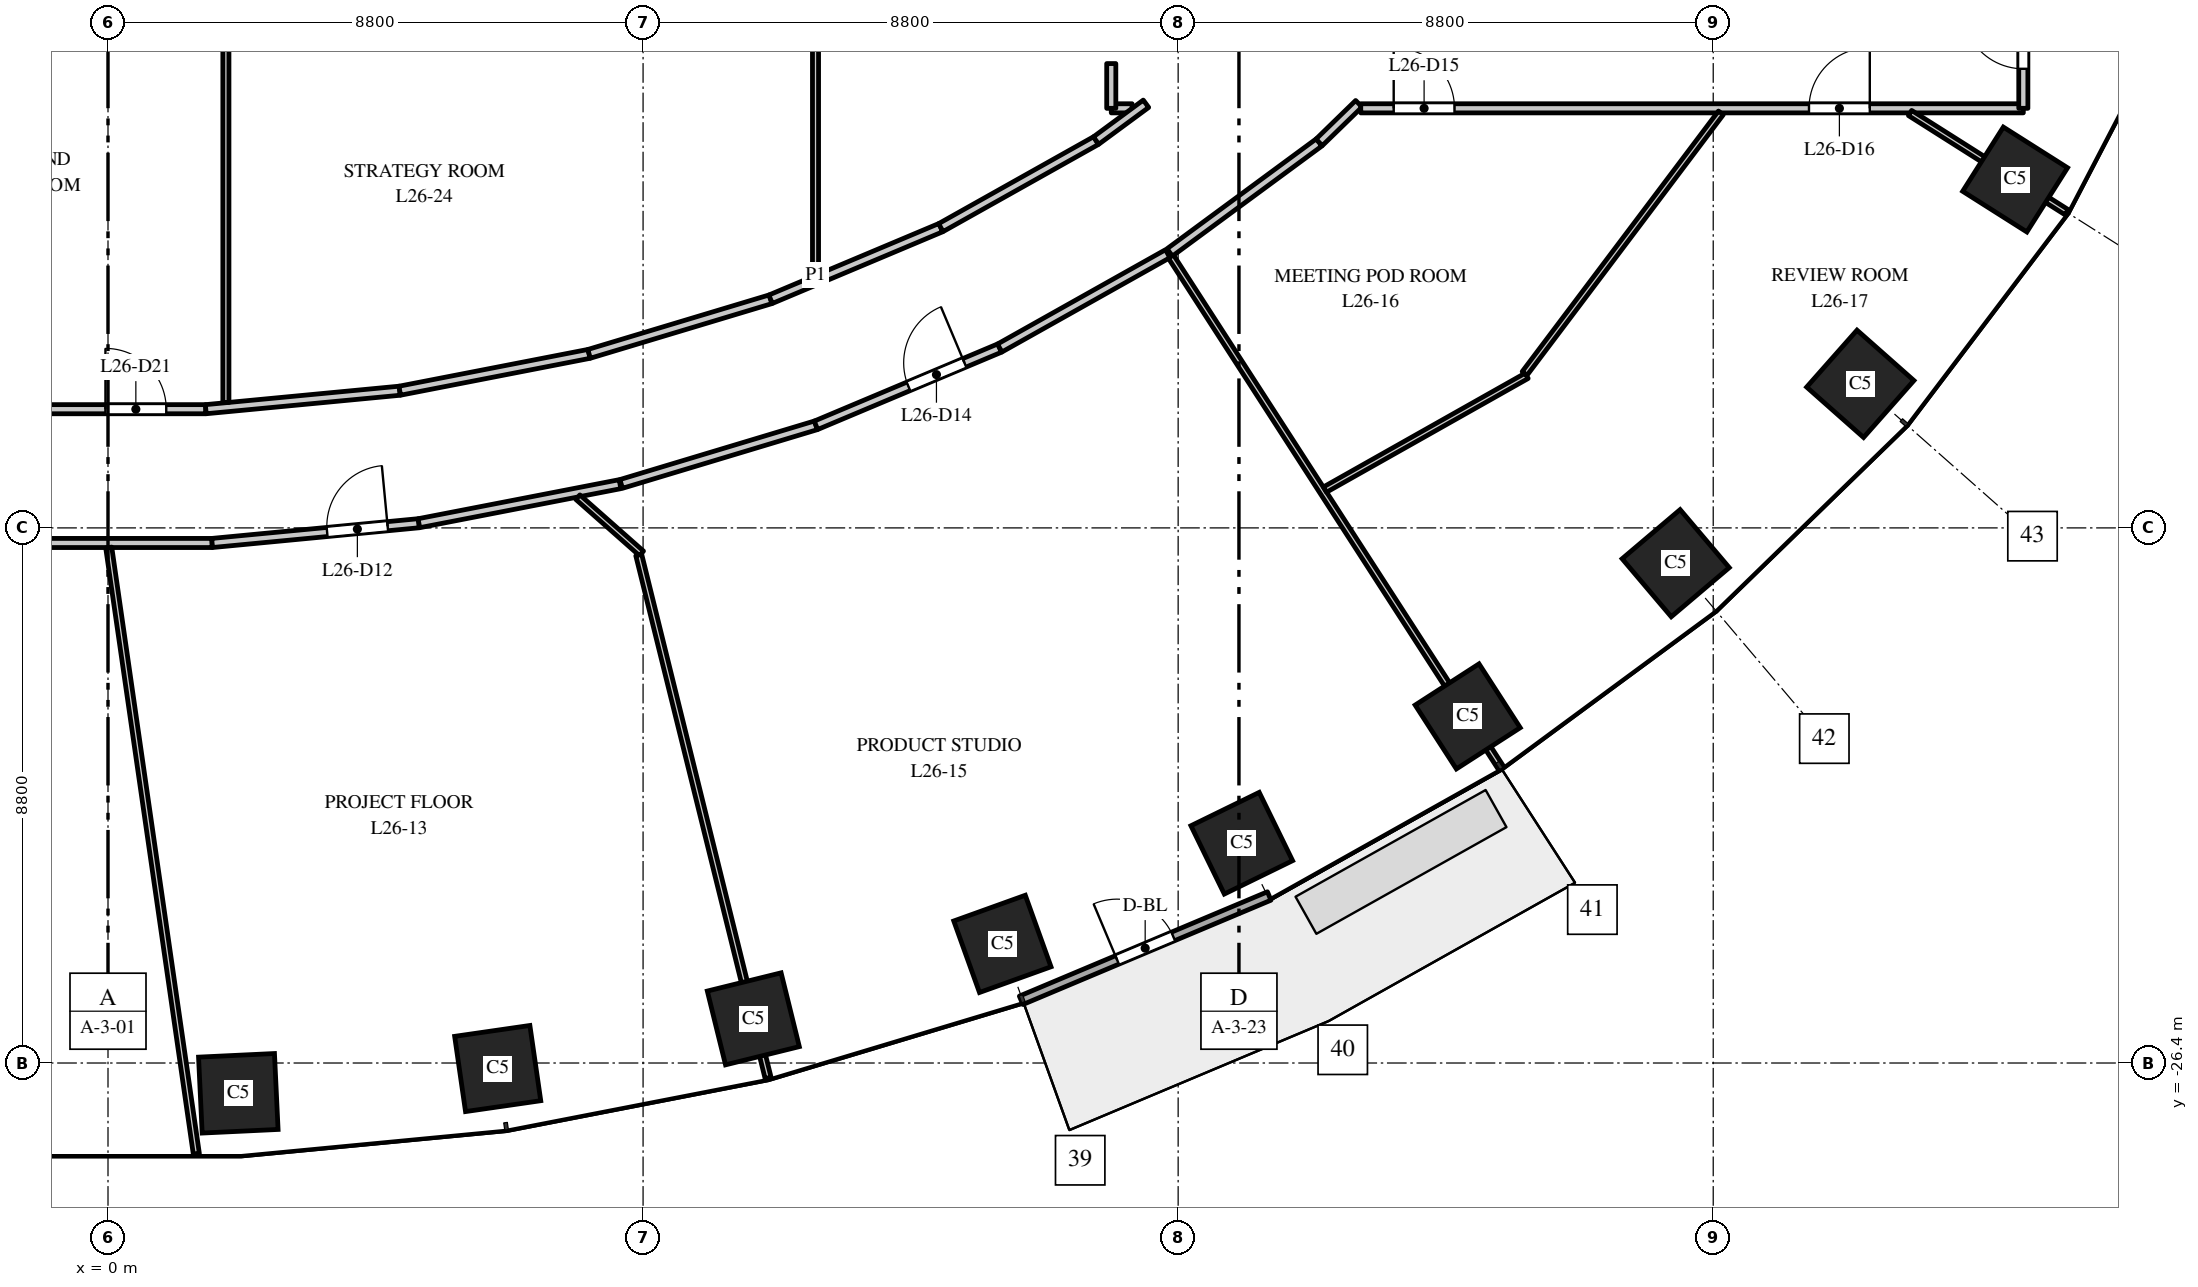
"""IFC4 building model, lengths in metres.
Left out: names, types, materials, properties, quantities, classifications, styles, units other than length and angle.
Written with IfcOpenShell. Run it as: python <this file> out.ifc"""

import sys

from ifc_helpers import new_model, si_unit, direction, frame, frame_2d, origin, origin_2d, place, context, subcontext, project, spatial, rectangle, extrude, element, fill, save


model = new_model("IFC4")
c1 = context("Model", 3, precision=1e-05, world=origin(), true_north=direction((0.0, 1.0)))
c2 = subcontext(c1, "Body", "Model", "MODEL_VIEW")
j1 = project(units=[si_unit("LENGTHUNIT", "METRE"), si_unit("PLANEANGLEUNIT", "RADIAN")], contexts=[c1])
p1 = place(None, origin())
s1 = spatial("IfcSite", under=j1, at=p1, CompositionType="ELEMENT")
p2 = place(p1, origin())
s2 = spatial("IfcBuilding", under=s1, at=p2, CompositionType="ELEMENT")
p3 = place(p2, frame((0.0, 0.0, 116.0)))
s3 = spatial("IfcBuildingStorey", under=s2, at=p3, CompositionType="ELEMENT", Elevation=116.0)
for number, where, z_axis, x_axis in (
    (1, (2.143, -26.898, 0.0), (0.0, 0.0, 1.0), (0.999, 0.048, 0.0)),
    (2, (6.409, -26.491, 0.0), (0.0, 0.0, 1.0), (0.99, 0.143, 0.0)),
    (3, (10.613, -25.674, 0.0), (0.0, 0.0, 1.0), (0.971, 0.24, 0.0)),
    (4, (14.709, -24.441, 0.0), (0.0, 0.0, 1.0), (0.941, 0.338, 0.0)),
    (5, (18.646, -22.785, 0.0), (0.0, 0.0, 1.0), (0.898, 0.439, 0.0)),
    (6, (22.362, -20.7, 0.0), (0.0, 0.0, 1.0), (0.84, 0.542, 0.0)),
    (7, (25.783, -18.18, 0.0), (0.0, 0.0, 1.0), (0.763, 0.646, 0.0)),
    (8, (28.819, -15.23, 0.0), (0.0, 0.0, 1.0), (0.663, 0.749, 0.0)),
    (9, (31.365, -11.871, 0.0), (0.0, 0.0, 1.0), (0.535, 0.845, 0.0)),
):
    element("IfcColumn", number, at=place(p3, frame(where, z_axis=z_axis, x_axis=x_axis)), inside=s3, PredefinedType="COLUMN", context=c2, shape_type="SweptSolid", body=[
        extrude(rectangle(XDim=1.25, YDim=1.25, at=origin_2d()), origin(), (0.0, 0.0, 1.0), 4.0),
    ])
p4 = place(p3, frame((15.018, -25.369, 0.0), z_axis=(0.0, 0.0, 1.0), x_axis=(0.921816985161, 0.387625393736, 0.0)))
e10 = element("IfcWall", 10, at=p4, inside=s3, PredefinedType="STANDARD", context=c2, shape_type="SweptSolid", body=[
    extrude(rectangle(XDim=4.426, YDim=0.15, at=frame_2d((2.213, 0.0))), origin(), (0.0, 0.0, 1.0), 3.7),
])
p5 = place(p4, frame((1.713, 0.0, 0.0)))
e11 = element("IfcOpeningElement", 11, at=p5, cuts=e10, PredefinedType="OPENING", context=c2, shape_type="SweptSolid", body=[
    extrude(rectangle(XDim=1.0, YDim=2.4, at=frame_2d((0.5, 1.2))), frame((0.0, 0.085, 0.0), z_axis=(0.0, -1.0, 0.0), x_axis=(1.0, 0.0, 0.0)), (0.0, 0.0, 1.0), 0.17),
])
p6 = place(p3, frame((-1.712, -17.848, 0.0), z_axis=(0.0, 0.0, 1.0), x_axis=(1.0, 0.0, 0.0)))
e12 = element("IfcWall", 12, at=p6, inside=s3, PredefinedType="PARTITIONING", context=c2, shape_type="SweptSolid", body=[
    extrude(rectangle(XDim=3.424, YDim=0.15, at=frame_2d((1.712, 0.0))), origin(), (0.0, 0.0, 1.0), 2.85),
])
p7 = place(p3, frame((-1.608, -15.648, 0.0), z_axis=(0.0, 0.0, 1.0), x_axis=(1.0, 0.0, 0.0)))
e13 = element("IfcWall", 13, at=p7, inside=s3, PredefinedType="PARTITIONING", context=c2, shape_type="SweptSolid", body=[
    extrude(rectangle(XDim=3.216, YDim=0.15, at=frame_2d((1.608, 0.0))), origin(), (0.0, 0.0, 1.0), 2.85),
])
p8 = place(p7, frame((1.566, 0.0, 0.0)))
e14 = element("IfcOpeningElement", 14, at=p8, cuts=e13, PredefinedType="OPENING", context=c2, shape_type="SweptSolid", body=[
    extrude(rectangle(XDim=1.0, YDim=2.1, at=frame_2d((0.5, 1.05))), frame((0.0, 0.085, 0.0), z_axis=(0.0, -1.0, 0.0), x_axis=(1.0, 0.0, 0.0)), (0.0, 0.0, 1.0), 0.17),
])
p9 = place(p3, frame((0.012, -17.923, 0.0), z_axis=(0.0, 0.0, 1.0), x_axis=(0.14302591048, -0.989718944414, 0.0)))
e15 = element("IfcWall", 15, at=p9, inside=s3, PredefinedType="PARTITIONING", context=c2, shape_type="SweptSolid", body=[
    extrude(rectangle(XDim=10.074, YDim=0.1, at=frame_2d((5.037, 0.0))), origin(), (0.0, 0.0, 1.0), 2.9),
])
p10 = place(p3, frame((1.608, -15.648, 0.0), z_axis=(0.0, 0.0, 1.0), x_axis=(0.995491705426, 0.09484863957, 0.0)))
e16 = element("IfcWall", 16, at=p10, inside=s3, PredefinedType="PARTITIONING", context=c2, shape_type="SweptSolid", body=[
    extrude(rectangle(XDim=3.205, YDim=0.15, at=frame_2d((1.602, 0.0))), origin(), (0.0, 0.0, 1.0), 2.85),
])
p11 = place(p3, frame((1.712, -17.848, 0.0), z_axis=(0.0, 0.0, 1.0), x_axis=(0.995466844572, 0.095109207532, 0.0)))
e17 = element("IfcWall", 17, at=p11, inside=s3, PredefinedType="PARTITIONING", context=c2, shape_type="SweptSolid", body=[
    extrude(rectangle(XDim=3.417, YDim=0.15, at=frame_2d((1.708, 0.0))), origin(), (0.0, 0.0, 1.0), 2.85),
])
p12 = place(p11, frame((1.9, 0.0, 0.0)))
e18 = element("IfcOpeningElement", 18, at=p12, cuts=e17, PredefinedType="OPENING", context=c2, shape_type="SweptSolid", body=[
    extrude(rectangle(XDim=1.0, YDim=2.1, at=frame_2d((0.5, 1.05))), frame((0.0, 0.085, 0.0), z_axis=(0.0, -1.0, 0.0), x_axis=(1.0, 0.0, 0.0)), (0.0, 0.0, 1.0), 0.17),
])
p13 = place(p3, frame((1.939, -15.537, 0.0), z_axis=(0.0, 0.0, 1.0), x_axis=(0.0, 1.0, 0.0)))
e19 = element("IfcWall", 19, at=p13, inside=s3, PredefinedType="PARTITIONING", context=c2, shape_type="SweptSolid", body=[
    extrude(rectangle(XDim=8.23, YDim=0.1, at=frame_2d((4.115, 0.0))), origin(), (0.0, 0.0, 1.0), 2.85),
])
p14 = place(p3, frame((4.798, -15.344, 0.0), z_axis=(0.0, 0.0, 1.0), x_axis=(0.981588545092, 0.191007665145, 0.0)))
e20 = element("IfcWall", 20, at=p14, inside=s3, PredefinedType="PARTITIONING", context=c2, shape_type="SweptSolid", body=[
    extrude(rectangle(XDim=3.172, YDim=0.15, at=frame_2d((1.586, 0.0))), origin(), (0.0, 0.0, 1.0), 3.7),
])
p15 = place(p3, frame((5.113, -17.523, 0.0), z_axis=(0.0, 0.0, 1.0), x_axis=(0.981690354374, 0.19048372143, 0.0)))
e21 = element("IfcWall", 21, at=p15, inside=s3, PredefinedType="PARTITIONING", context=c2, shape_type="SweptSolid", body=[
    extrude(rectangle(XDim=3.37, YDim=0.15, at=frame_2d((1.685, 0.0))), origin(), (0.0, 0.0, 1.0), 3.7),
])
p16 = place(p3, frame((7.728, -17.095, 0.0), z_axis=(0.0, 0.0, 1.0), x_axis=(0.749403770292, -0.662113275106, 0.0)))
e22 = element("IfcWall", 22, at=p16, inside=s3, PredefinedType="PARTITIONING", context=c2, shape_type="SweptSolid", body=[
    extrude(rectangle(XDim=1.396, YDim=0.1, at=frame_2d((0.698, 0.0))), origin(), (0.0, 0.0, 1.0), 3.7),
])
p17 = place(p3, frame((7.912, -14.738, 0.0), z_axis=(0.0, 0.0, 1.0), x_axis=(0.957606118849, 0.28808075455, 0.0)))
e23 = element("IfcWall", 23, at=p17, inside=s3, PredefinedType="PARTITIONING", context=c2, shape_type="SweptSolid", body=[
    extrude(rectangle(XDim=3.117, YDim=0.15, at=frame_2d((1.559, 0.0))), origin(), (0.0, 0.0, 1.0), 2.85),
])
p18 = place(p3, frame((8.44, -16.877, 0.0), z_axis=(0.0, 0.0, 1.0), x_axis=(0.957584891346, 0.288151307243, 0.0)))
e24 = element("IfcWall", 24, at=p18, inside=s3, PredefinedType="PARTITIONING", context=c2, shape_type="SweptSolid", body=[
    extrude(rectangle(XDim=3.345, YDim=0.15, at=frame_2d((1.672, 0.0))), origin(), (0.0, 0.0, 1.0), 2.85),
])
p19 = place(p3, frame((8.729, -18.046, 0.0), z_axis=(0.0, 0.0, 1.0), x_axis=(0.240109518445, -0.970745805632, 0.0)))
e25 = element("IfcWall", 25, at=p19, inside=s3, PredefinedType="PARTITIONING", context=c2, shape_type="SweptSolid", body=[
    extrude(rectangle(XDim=8.858, YDim=0.1, at=frame_2d((4.429, 0.0))), origin(), (0.0, 0.0, 1.0), 2.9),
])
p20 = place(p3, frame((10.897, -13.84, 0.0), z_axis=(0.0, 0.0, 1.0), x_axis=(0.921751821358, 0.387780324183, 0.0)))
e26 = element("IfcWall", 26, at=p20, inside=s3, PredefinedType="PARTITIONING", context=c2, shape_type="SweptSolid", body=[
    extrude(rectangle(XDim=3.038, YDim=0.15, at=frame_2d((1.519, 0.0))), origin(), (0.0, 0.0, 1.0), 3.7),
])
p21 = place(p3, frame((11.636, -13.444, 0.0), z_axis=(0.0, 0.0, 1.0), x_axis=(0.0, 1.0, 0.0)))
e27 = element("IfcWall", 27, at=p21, inside=s3, PredefinedType="PARTITIONING", context=c2, shape_type="SweptSolid", body=[
    extrude(rectangle(XDim=26.888, YDim=0.1, at=frame_2d((13.444, 0.0))), origin(), (0.0, 0.0, 1.0), 2.75),
])
p22 = place(p3, frame((11.643, -15.913, 0.0), z_axis=(0.0, 0.0, 1.0), x_axis=(0.921789499058, 0.38769075231, 0.0)))
e28 = element("IfcWall", 28, at=p22, inside=s3, PredefinedType="PARTITIONING", context=c2, shape_type="SweptSolid", body=[
    extrude(rectangle(XDim=3.278, YDim=0.15, at=frame_2d((1.639, 0.0))), origin(), (0.0, 0.0, 1.0), 3.7),
])
p23 = place(p22, frame((1.65, 0.0, 0.0)))
e29 = element("IfcOpeningElement", 29, at=p23, cuts=e28, PredefinedType="OPENING", context=c2, shape_type="SweptSolid", body=[
    extrude(rectangle(XDim=1.0, YDim=2.1, at=frame_2d((0.5, 1.05))), frame((0.0, 0.085, 0.0), z_axis=(0.0, -1.0, 0.0), x_axis=(1.0, 0.0, 0.0)), (0.0, 0.0, 1.0), 0.17),
])
p24 = place(p3, frame((13.697, -12.662, 0.0), z_axis=(0.0, 0.0, 1.0), x_axis=(0.872147381065, 0.489243237767, 0.0)))
e30 = element("IfcWall", 30, at=p24, inside=s3, PredefinedType="PARTITIONING", context=c2, shape_type="SweptSolid", body=[
    extrude(rectangle(XDim=2.927, YDim=0.15, at=frame_2d((1.464, 0.0))), origin(), (0.0, 0.0, 1.0), 3.7),
])
p25 = place(p3, frame((14.665, -14.642, 0.0), z_axis=(0.0, 0.0, 1.0), x_axis=(0.871997056828, 0.4895111162, 0.0)))
e31 = element("IfcWall", 31, at=p25, inside=s3, PredefinedType="PARTITIONING", context=c2, shape_type="SweptSolid", body=[
    extrude(rectangle(XDim=3.168, YDim=0.15, at=frame_2d((1.584, 0.0))), origin(), (0.0, 0.0, 1.0), 3.7),
])
p26 = place(p3, frame((16.25, -11.23, 0.0), z_axis=(0.0, 0.0, 1.0), x_axis=(0.805055837353, 0.59319903805, 0.0)))
e32 = element("IfcWall", 32, at=p26, inside=s3, PredefinedType="PARTITIONING", context=c2, shape_type="SweptSolid", body=[
    extrude(rectangle(XDim=1.02, YDim=0.15, at=frame_2d((0.51, 0.0))), origin(), (0.0, 0.0, 1.0), 3.7),
])
p27 = place(p3, frame((16.5, -10.7, 0.0), z_axis=(0.0, 0.0, 1.0), x_axis=(0.0, 1.0, 0.0)))
e33 = element("IfcWall", 33, at=p27, inside=s3, PredefinedType="PARTITIONING", context=c2, shape_type="SweptSolid", body=[
    extrude(rectangle(XDim=0.736, YDim=0.15, at=frame_2d((0.368, 0.0))), origin(), (0.0, 0.0, 1.0), 3.7),
])
p28 = place(p3, frame((16.5, -10.7, 0.0), z_axis=(0.0, 0.0, 1.0), x_axis=(1.0, 0.0, 0.0)))
e34 = element("IfcWall", 34, at=p28, inside=s3, PredefinedType="PARTITIONING", context=c2, shape_type="SweptSolid", body=[
    extrude(rectangle(XDim=0.343, YDim=0.15, at=frame_2d((0.171, 0.0))), origin(), (0.0, 0.0, 1.0), 3.7),
])
p29 = place(p3, frame((17.447, -13.085, 0.0), z_axis=(0.0, 0.0, 1.0), x_axis=(0.542325736183, -0.840168314015, 0.0)))
e35 = element("IfcWall", 35, at=p29, inside=s3, PredefinedType="PARTITIONING", context=c2, shape_type="SweptSolid", body=[
    extrude(rectangle(XDim=10.066, YDim=0.1, at=frame_2d((5.033, 0.0))), origin(), (0.0, 0.0, 1.0), 3.7),
])
p30 = place(p3, frame((17.461, -13.07, 0.0), z_axis=(0.0, 0.0, 1.0), x_axis=(0.805228684186, 0.592964388613, 0.0)))
e36 = element("IfcWall", 36, at=p30, inside=s3, PredefinedType="PARTITIONING", context=c2, shape_type="SweptSolid", body=[
    extrude(rectangle(XDim=3.052, YDim=0.15, at=frame_2d((1.526, 0.0))), origin(), (0.0, 0.0, 1.0), 3.7),
])
p31 = place(p3, frame((19.919, -11.26, 0.0), z_axis=(0.0, 0.0, 1.0), x_axis=(0.716953986293, 0.697120492841, 0.0)))
e37 = element("IfcWall", 37, at=p31, inside=s3, PredefinedType="PARTITIONING", context=c2, shape_type="SweptSolid", body=[
    extrude(rectangle(XDim=0.911, YDim=0.15, at=frame_2d((0.456, 0.0))), origin(), (0.0, 0.0, 1.0), 2.75),
])
p32 = place(p3, frame((20.015, -16.97, 0.0), z_axis=(0.0, 0.0, 1.0), x_axis=(0.871018559545, 0.491250108324, 0.0)))
e38 = element("IfcWall", 38, at=p32, inside=s3, PredefinedType="PARTITIONING", context=c2, shape_type="SweptSolid", body=[
    extrude(rectangle(XDim=3.808, YDim=0.1, at=frame_2d((1.904, 0.0))), origin(), (0.0, 0.0, 1.0), 3.7),
])
p33 = place(p3, frame((20.603, -10.7, 0.0), z_axis=(0.0, 0.0, 1.0), x_axis=(1.0, 0.0, 0.0)))
e39 = element("IfcWall", 39, at=p33, inside=s3, PredefinedType="PARTITIONING", context=c2, shape_type="SweptSolid", body=[
    extrude(rectangle(XDim=10.897, YDim=0.15, at=frame_2d((5.448, 0.0))), origin(), (0.0, 0.0, 1.0), 2.9),
])
p34 = place(p33, frame((0.542, 0.0, 0.0)))
e40 = element("IfcOpeningElement", 40, at=p34, cuts=e39, PredefinedType="OPENING", context=c2, shape_type="SweptSolid", body=[
    extrude(rectangle(XDim=1.0, YDim=2.1, at=frame_2d((0.5, 1.05))), frame((0.0, 0.085, 0.0), z_axis=(0.0, -1.0, 0.0), x_axis=(1.0, 0.0, 0.0)), (0.0, 0.0, 1.0), 0.17),
])
p35 = place(p33, frame((7.372, 0.0, 0.0)))
e41 = element("IfcOpeningElement", 41, at=p35, cuts=e39, PredefinedType="OPENING", context=c2, shape_type="SweptSolid", body=[
    extrude(rectangle(XDim=1.0, YDim=2.1, at=frame_2d((0.5, 1.05))), frame((0.0, 0.085, 0.0), z_axis=(0.0, -1.0, 0.0), x_axis=(1.0, 0.0, 0.0)), (0.0, 0.0, 1.0), 0.17),
])
p36 = place(p3, frame((23.298, -15.06, 0.0), z_axis=(0.0, 0.0, 1.0), x_axis=(0.601658833238, 0.798753183647, 0.0)))
e42 = element("IfcWall", 42, at=p36, inside=s3, PredefinedType="PARTITIONING", context=c2, shape_type="SweptSolid", body=[
    extrude(rectangle(XDim=5.365, YDim=0.1, at=frame_2d((2.682, 0.0))), origin(), (0.0, 0.0, 1.0), 2.75),
])
p37 = place(p3, frame((29.637, -10.777, 0.0), z_axis=(0.0, 0.0, 1.0), x_axis=(0.844810627195, -0.535065420467, 0.0)))
e43 = element("IfcWall", 43, at=p37, inside=s3, PredefinedType="PARTITIONING", context=c2, shape_type="SweptSolid", body=[
    extrude(rectangle(XDim=3.048, YDim=0.1, at=frame_2d((1.524, 0.0))), origin(), (0.0, 0.0, 1.0), 2.9),
])
p38 = place(p3, frame((31.5, -10.7, 0.0), z_axis=(0.0, 0.0, 1.0), x_axis=(0.0, 1.0, 0.0)))
e44 = element("IfcWall", 44, at=p38, inside=s3, PredefinedType="PARTITIONING", context=c2, shape_type="SweptSolid", body=[
    extrude(rectangle(XDim=2.2, YDim=0.15, at=frame_2d((1.1, 0.0))), origin(), (0.0, 0.0, 1.0), 2.9),
])
p39 = place(p38, frame((0.65, 0.0, 0.0)))
e45 = element("IfcOpeningElement", 45, at=p39, cuts=e44, PredefinedType="OPENING", context=c2, shape_type="SweptSolid", body=[
    extrude(rectangle(XDim=1.0, YDim=2.1, at=frame_2d((0.5, 1.05))), frame((0.0, 0.085, 0.0), z_axis=(0.0, -1.0, 0.0), x_axis=(1.0, 0.0, 0.0)), (0.0, 0.0, 1.0), 0.17),
])
p40 = place(p5, origin())
e46 = element("IfcDoor", 46, at=p40, inside=s3, OperationType="SINGLE_SWING_LEFT", PredefinedType="DOOR", context=c2, shape_type="SweptSolid", body=[
    extrude(rectangle(XDim=1.0, YDim=2.4, at=frame_2d((0.5, 1.2))), frame((0.0, 0.025, 0.0), z_axis=(0.0, -1.0, 0.0), x_axis=(1.0, 0.0, 0.0)), (0.0, 0.0, 1.0), 0.05),
])
fill(e11, e46)
p41 = place(p12, origin())
e47 = element("IfcDoor", 47, at=p41, inside=s3, OperationType="SINGLE_SWING_RIGHT", PredefinedType="DOOR", context=c2, shape_type="SweptSolid", body=[
    extrude(rectangle(XDim=1.0, YDim=2.1, at=frame_2d((0.5, 1.05))), frame((0.0, 0.025, 0.0), z_axis=(0.0, -1.0, 0.0), x_axis=(1.0, 0.0, 0.0)), (0.0, 0.0, 1.0), 0.05),
])
fill(e18, e47)
p42 = place(p23, origin())
e48 = element("IfcDoor", 48, at=p42, inside=s3, OperationType="SINGLE_SWING_RIGHT", PredefinedType="DOOR", context=c2, shape_type="SweptSolid", body=[
    extrude(rectangle(XDim=1.0, YDim=2.1, at=frame_2d((0.5, 1.05))), frame((0.0, 0.025, 0.0), z_axis=(0.0, -1.0, 0.0), x_axis=(1.0, 0.0, 0.0)), (0.0, 0.0, 1.0), 0.05),
])
fill(e29, e48)
p43 = place(p34, origin())
e49 = element("IfcDoor", 49, at=p43, inside=s3, OperationType="SINGLE_SWING_LEFT", PredefinedType="DOOR", context=c2, shape_type="SweptSolid", body=[
    extrude(rectangle(XDim=1.0, YDim=2.1, at=frame_2d((0.5, 1.05))), frame((0.0, 0.025, 0.0), z_axis=(0.0, -1.0, 0.0), x_axis=(1.0, 0.0, 0.0)), (0.0, 0.0, 1.0), 0.05),
])
fill(e40, e49)
p44 = place(p35, origin())
e50 = element("IfcDoor", 50, at=p44, inside=s3, OperationType="SINGLE_SWING_RIGHT", PredefinedType="DOOR", context=c2, shape_type="SweptSolid", body=[
    extrude(rectangle(XDim=1.0, YDim=2.1, at=frame_2d((0.5, 1.05))), frame((0.0, 0.025, 0.0), z_axis=(0.0, -1.0, 0.0), x_axis=(1.0, 0.0, 0.0)), (0.0, 0.0, 1.0), 0.05),
])
fill(e41, e50)
p45 = place(p39, origin())
e51 = element("IfcDoor", 51, at=p45, inside=s3, OperationType="SINGLE_SWING_RIGHT", PredefinedType="DOOR", context=c2, shape_type="SweptSolid", body=[
    extrude(rectangle(XDim=1.0, YDim=2.1, at=frame_2d((0.5, 1.05))), frame((0.0, 0.025, 0.0), z_axis=(0.0, -1.0, 0.0), x_axis=(1.0, 0.0, 0.0)), (0.0, 0.0, 1.0), 0.05),
])
fill(e45, e51)
p46 = place(p8, origin())
e52 = element("IfcDoor", 52, at=p46, inside=s3, OperationType="SINGLE_SWING_LEFT", PredefinedType="DOOR", context=c2, shape_type="SweptSolid", body=[
    extrude(rectangle(XDim=1.0, YDim=2.1, at=frame_2d((0.5, 1.05))), frame((0.0, 0.025, 0.0), z_axis=(0.0, -1.0, 0.0), x_axis=(1.0, 0.0, 0.0)), (0.0, 0.0, 1.0), 0.05),
])
fill(e14, e52)
save(model, sys.argv[1])
